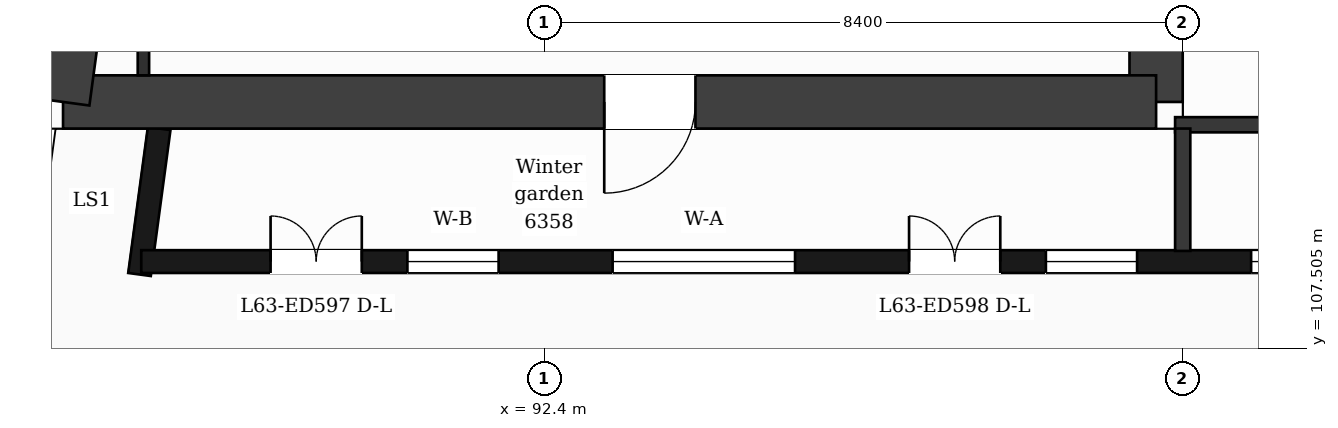
"""IFC4 building model, lengths in metres.
Left out: names, types, materials, properties, quantities, classifications, styles, units other than length and angle.
Written with IfcOpenShell. Run it as: python <this file> out.ifc"""

import sys

from ifc_helpers import new_model, si_unit, direction, frame, frame_2d, origin, place, context, subcontext, project, spatial, rectangle, extrude, element, fill, save


model = new_model("IFC4")
c1 = context("Model", 3, precision=1e-05, world=origin(), true_north=direction((0.0, 1.0)))
c2 = subcontext(c1, "Body", "Model", "MODEL_VIEW")
j1 = project(units=[si_unit("LENGTHUNIT", "METRE"), si_unit("PLANEANGLEUNIT", "RADIAN")], contexts=[c1])
p1 = place(None, origin())
s1 = spatial("IfcSite", under=j1, at=p1, CompositionType="ELEMENT")
p2 = place(p1, origin())
s2 = spatial("IfcBuilding", under=s1, at=p2, CompositionType="ELEMENT")
p3 = place(p2, frame((0.0, 0.0, 262.7)))
s3 = spatial("IfcBuildingStorey", under=s2, at=p3, CompositionType="ELEMENT", Elevation=262.7)
p4 = place(p3, frame((100.45, 132.05, 0.0), z_axis=(0.0, 0.0, 1.0), x_axis=(0.0, -1.0, 0.0)))
e1 = element("IfcWall", 1, at=p4, inside=s3, PredefinedType="SHEAR", context=c2, shape_type="SweptSolid", body=[
    extrude(rectangle(XDim=21.3, YDim=0.7, at=frame_2d((10.65, 0.0))), origin(), (0.0, 0.0, 1.0), 3.7),
])
p5 = place(p4, frame((7.9, 0.0, 0.0)))
e2 = element("IfcOpeningElement", 2, at=p5, cuts=e1, PredefinedType="OPENING", context=c2, shape_type="SweptSolid", body=[
    extrude(rectangle(XDim=1.4, YDim=2.1, at=frame_2d((0.7, 1.05))), frame((0.0, 0.36, 0.0), z_axis=(0.0, -1.0, 0.0), x_axis=(1.0, 0.0, 0.0)), (0.0, 0.0, 1.0), 0.72),
])
p6 = place(p3, frame((100.45, 110.75, 0.0), z_axis=(0.0, 0.0, 1.0), x_axis=(-1.0, 0.0, 0.0)))
e3 = element("IfcWall", 3, at=p6, inside=s3, PredefinedType="SHEAR", context=c2, shape_type="SweptSolid", body=[
    extrude(rectangle(XDim=14.38, YDim=0.7, at=frame_2d((7.19, 0.0))), origin(), (0.0, 0.0, 1.0), 3.7),
])
p7 = place(p6, frame((6.06, 0.0, 0.0)))
e4 = element("IfcOpeningElement", 4, at=p7, cuts=e3, PredefinedType="OPENING", context=c2, shape_type="SweptSolid", body=[
    extrude(rectangle(XDim=1.2, YDim=2.1, at=frame_2d((0.6, 1.05))), frame((0.0, 0.36, 0.0), z_axis=(0.0, -1.0, 0.0), x_axis=(1.0, 0.0, 0.0)), (0.0, 0.0, 1.0), 0.72),
])
p8 = place(p3, frame((86.07, 110.75, 0.0), z_axis=(0.0, 0.0, 1.0), x_axis=(0.133406218907, 0.991061441464, 0.0)))
e5 = element("IfcWall", 5, at=p8, inside=s3, PredefinedType="SHEAR", context=c2, shape_type="SweptSolid", body=[
    extrude(rectangle(XDim=21.492, YDim=0.7, at=frame_2d((10.746, 0.0))), origin(), (0.0, 0.0, 1.0), 3.7),
])
p9 = place(p3, frame((87.334, 110.4, 0.0), z_axis=(0.0, 0.0, 1.0), x_axis=(-0.13345962011, -0.991054251694, 0.0)))
e6 = element("IfcWall", 6, at=p9, inside=s3, PredefinedType="SOLIDWALL", context=c2, shape_type="SweptSolid", body=[
    extrude(rectangle(XDim=1.937, YDim=0.3, at=frame_2d((0.969, 0.0))), origin(), (0.0, 0.0, 1.0), 3.38),
])
p10 = place(p3, frame((87.099, 108.65, 0.0), z_axis=(0.0, 0.0, 1.0), x_axis=(1.0, 0.0, 0.0)))
e7 = element("IfcWall", 7, at=p10, inside=s3, PredefinedType="SOLIDWALL", context=c2, shape_type="SweptSolid", body=[
    extrude(rectangle(XDim=52.774, YDim=0.3, at=frame_2d((26.387, 0.0))), origin(), (0.0, 0.0, 1.0), 3.38),
])
p11 = place(p10, frame((1.701, 0.0, 0.0)))
e8 = element("IfcOpeningElement", 8, at=p11, cuts=e7, PredefinedType="OPENING", context=c2, shape_type="SweptSolid", body=[
    extrude(rectangle(XDim=1.2, YDim=2.4, at=frame_2d((0.6, 1.2))), frame((0.0, 0.16, 0.0), z_axis=(0.0, -1.0, 0.0), x_axis=(1.0, 0.0, 0.0)), (0.0, 0.0, 1.0), 0.32),
])
p12 = place(p10, frame((3.501, 0.0, 0.9)))
e9 = element("IfcOpeningElement", 9, at=p12, cuts=e7, PredefinedType="OPENING", context=c2, shape_type="SweptSolid", body=[
    extrude(rectangle(XDim=1.2, YDim=2.1, at=frame_2d((0.6, 1.05))), frame((0.0, 0.16, 0.0), z_axis=(0.0, -1.0, 0.0), x_axis=(1.0, 0.0, 0.0)), (0.0, 0.0, 1.0), 0.32),
])
p13 = place(p10, frame((6.201, 0.0, 0.9)))
e10 = element("IfcOpeningElement", 10, at=p13, cuts=e7, PredefinedType="OPENING", context=c2, shape_type="SweptSolid", body=[
    extrude(rectangle(XDim=2.4, YDim=2.1, at=frame_2d((1.2, 1.05))), frame((0.0, 0.16, 0.0), z_axis=(0.0, -1.0, 0.0), x_axis=(1.0, 0.0, 0.0)), (0.0, 0.0, 1.0), 0.32),
])
p14 = place(p10, frame((10.102, 0.0, 0.0)))
e11 = element("IfcOpeningElement", 11, at=p14, cuts=e7, PredefinedType="OPENING", context=c2, shape_type="SweptSolid", body=[
    extrude(rectangle(XDim=1.2, YDim=2.4, at=frame_2d((0.6, 1.2))), frame((0.0, 0.16, 0.0), z_axis=(0.0, -1.0, 0.0), x_axis=(1.0, 0.0, 0.0)), (0.0, 0.0, 1.0), 0.32),
])
p15 = place(p10, frame((11.901, 0.0, 0.9)))
e12 = element("IfcOpeningElement", 12, at=p15, cuts=e7, PredefinedType="OPENING", context=c2, shape_type="SweptSolid", body=[
    extrude(rectangle(XDim=1.2, YDim=2.1, at=frame_2d((0.6, 1.05))), frame((0.0, 0.16, 0.0), z_axis=(0.0, -1.0, 0.0), x_axis=(1.0, 0.0, 0.0)), (0.0, 0.0, 1.0), 0.32),
])
p16 = place(p10, frame((14.602, 0.0, 0.9)))
e13 = element("IfcOpeningElement", 13, at=p16, cuts=e7, PredefinedType="OPENING", context=c2, shape_type="SweptSolid", body=[
    extrude(rectangle(XDim=2.4, YDim=2.1, at=frame_2d((1.2, 1.05))), frame((0.0, 0.16, 0.0), z_axis=(0.0, -1.0, 0.0), x_axis=(1.0, 0.0, 0.0)), (0.0, 0.0, 1.0), 0.32),
])
p17 = place(p10, frame((18.802, 0.0, 0.9)))
e14 = element("IfcOpeningElement", 14, at=p17, cuts=e7, PredefinedType="OPENING", context=c2, shape_type="SweptSolid", body=[
    extrude(rectangle(XDim=2.4, YDim=2.1, at=frame_2d((1.2, 1.05))), frame((0.0, 0.16, 0.0), z_axis=(0.0, -1.0, 0.0), x_axis=(1.0, 0.0, 0.0)), (0.0, 0.0, 1.0), 0.32),
])
p18 = place(p10, frame((23.602, 0.0, 0.9)))
e15 = element("IfcOpeningElement", 15, at=p18, cuts=e7, PredefinedType="OPENING", context=c2, shape_type="SweptSolid", body=[
    extrude(rectangle(XDim=1.2, YDim=2.1, at=frame_2d((0.6, 1.05))), frame((0.0, 0.16, 0.0), z_axis=(0.0, -1.0, 0.0), x_axis=(1.0, 0.0, 0.0)), (0.0, 0.0, 1.0), 0.32),
])
p19 = place(p10, frame((27.802, 0.0, 0.9)))
e16 = element("IfcOpeningElement", 16, at=p19, cuts=e7, PredefinedType="OPENING", context=c2, shape_type="SweptSolid", body=[
    extrude(rectangle(XDim=1.2, YDim=2.1, at=frame_2d((0.6, 1.05))), frame((0.0, 0.16, 0.0), z_axis=(0.0, -1.0, 0.0), x_axis=(1.0, 0.0, 0.0)), (0.0, 0.0, 1.0), 0.32),
])
p20 = place(p10, frame((31.401, 0.0, 0.9)))
e17 = element("IfcOpeningElement", 17, at=p20, cuts=e7, PredefinedType="OPENING", context=c2, shape_type="SweptSolid", body=[
    extrude(rectangle(XDim=2.4, YDim=2.1, at=frame_2d((1.2, 1.05))), frame((0.0, 0.16, 0.0), z_axis=(0.0, -1.0, 0.0), x_axis=(1.0, 0.0, 0.0)), (0.0, 0.0, 1.0), 0.32),
])
p21 = place(p10, frame((35.602, 0.0, 0.9)))
e18 = element("IfcOpeningElement", 18, at=p21, cuts=e7, PredefinedType="OPENING", context=c2, shape_type="SweptSolid", body=[
    extrude(rectangle(XDim=2.4, YDim=2.1, at=frame_2d((1.2, 1.05))), frame((0.0, 0.16, 0.0), z_axis=(0.0, -1.0, 0.0), x_axis=(1.0, 0.0, 0.0)), (0.0, 0.0, 1.0), 0.32),
])
p22 = place(p10, frame((39.802, 0.0, 0.9)))
e19 = element("IfcOpeningElement", 19, at=p22, cuts=e7, PredefinedType="OPENING", context=c2, shape_type="SweptSolid", body=[
    extrude(rectangle(XDim=2.4, YDim=2.1, at=frame_2d((1.2, 1.05))), frame((0.0, 0.16, 0.0), z_axis=(0.0, -1.0, 0.0), x_axis=(1.0, 0.0, 0.0)), (0.0, 0.0, 1.0), 0.32),
])
p23 = place(p10, frame((44.001, 0.0, 0.9)))
e20 = element("IfcOpeningElement", 20, at=p23, cuts=e7, PredefinedType="OPENING", context=c2, shape_type="SweptSolid", body=[
    extrude(rectangle(XDim=2.4, YDim=2.1, at=frame_2d((1.2, 1.05))), frame((0.0, 0.16, 0.0), z_axis=(0.0, -1.0, 0.0), x_axis=(1.0, 0.0, 0.0)), (0.0, 0.0, 1.0), 0.32),
])
p24 = place(p10, frame((48.201, 0.0, 0.9)))
e21 = element("IfcOpeningElement", 21, at=p24, cuts=e7, PredefinedType="OPENING", context=c2, shape_type="SweptSolid", body=[
    extrude(rectangle(XDim=2.4, YDim=2.1, at=frame_2d((1.2, 1.05))), frame((0.0, 0.16, 0.0), z_axis=(0.0, -1.0, 0.0), x_axis=(1.0, 0.0, 0.0)), (0.0, 0.0, 1.0), 0.32),
])
p25 = place(p3, frame((100.7, 110.45, 0.0), z_axis=(0.0, 0.0, 1.0), x_axis=(1.0, 0.0, 0.0)))
e22 = element("IfcWall", 22, at=p25, inside=s3, PredefinedType="PARTITIONING", context=c2, shape_type="SweptSolid", body=[
    extrude(rectangle(XDim=25.4, YDim=0.2, at=frame_2d((12.7, 0.0))), origin(), (0.0, 0.0, 1.0), 3.38),
])
p26 = place(p3, frame((87.127, 111.1, 0.0), z_axis=(0.0, 0.0, 1.0), x_axis=(0.0, 1.0, 0.0)))
e23 = element("IfcWall", 23, at=p26, inside=s3, PredefinedType="PARTITIONING", context=c2, shape_type="SweptSolid", body=[
    extrude(rectangle(XDim=1.8, YDim=0.15, at=frame_2d((0.9, 0.0))), origin(), (0.0, 0.0, 1.0), 3.38),
])
p27 = place(p3, frame((100.8, 108.79, 0.0), z_axis=(0.0, 0.0, 1.0), x_axis=(0.0, 1.0, 0.0)))
e24 = element("IfcWall", 24, at=p27, inside=s3, PredefinedType="PARTITIONING", context=c2, shape_type="SweptSolid", body=[
    extrude(rectangle(XDim=1.61, YDim=0.2, at=frame_2d((0.805, 0.0))), origin(), (0.0, 0.0, 1.0), 3.38),
])
p28 = place(p11, origin())
e25 = element("IfcDoor", 25, at=p28, inside=s3, OperationType="DOUBLE_DOOR_SINGLE_SWING", PredefinedType="DOOR", context=c2, shape_type="SweptSolid", body=[
    extrude(rectangle(XDim=1.2, YDim=2.4, at=frame_2d((0.6, 1.2))), frame((0.0, 0.025, 0.0), z_axis=(0.0, -1.0, 0.0), x_axis=(1.0, 0.0, 0.0)), (0.0, 0.0, 1.0), 0.05),
])
fill(e8, e25)
p29 = place(p12, origin())
e26 = element("IfcWindow", 26, at=p29, inside=s3, PartitioningType="SINGLE_PANEL", PredefinedType="WINDOW", context=c2, shape_type="SweptSolid", body=[
    extrude(rectangle(XDim=1.2, YDim=2.1, at=frame_2d((0.6, 1.05))), frame((0.0, 0.03, 0.0), z_axis=(0.0, -1.0, 0.0), x_axis=(1.0, 0.0, 0.0)), (0.0, 0.0, 1.0), 0.06),
])
fill(e9, e26)
p30 = place(p13, origin())
e27 = element("IfcWindow", 27, at=p30, inside=s3, PartitioningType="SINGLE_PANEL", PredefinedType="WINDOW", context=c2, shape_type="SweptSolid", body=[
    extrude(rectangle(XDim=2.4, YDim=2.1, at=frame_2d((1.2, 1.05))), frame((0.0, 0.03, 0.0), z_axis=(0.0, -1.0, 0.0), x_axis=(1.0, 0.0, 0.0)), (0.0, 0.0, 1.0), 0.06),
])
fill(e10, e27)
p31 = place(p14, origin())
e28 = element("IfcDoor", 28, at=p31, inside=s3, OperationType="DOUBLE_DOOR_SINGLE_SWING", PredefinedType="DOOR", context=c2, shape_type="SweptSolid", body=[
    extrude(rectangle(XDim=1.2, YDim=2.4, at=frame_2d((0.6, 1.2))), frame((0.0, 0.025, 0.0), z_axis=(0.0, -1.0, 0.0), x_axis=(1.0, 0.0, 0.0)), (0.0, 0.0, 1.0), 0.05),
])
fill(e11, e28)
p32 = place(p15, origin())
e29 = element("IfcWindow", 29, at=p32, inside=s3, PartitioningType="SINGLE_PANEL", PredefinedType="WINDOW", context=c2, shape_type="SweptSolid", body=[
    extrude(rectangle(XDim=1.2, YDim=2.1, at=frame_2d((0.6, 1.05))), frame((0.0, 0.03, 0.0), z_axis=(0.0, -1.0, 0.0), x_axis=(1.0, 0.0, 0.0)), (0.0, 0.0, 1.0), 0.06),
])
fill(e12, e29)
p33 = place(p16, origin())
e30 = element("IfcWindow", 30, at=p33, inside=s3, PartitioningType="SINGLE_PANEL", PredefinedType="WINDOW", context=c2, shape_type="SweptSolid", body=[
    extrude(rectangle(XDim=2.4, YDim=2.1, at=frame_2d((1.2, 1.05))), frame((0.0, 0.03, 0.0), z_axis=(0.0, -1.0, 0.0), x_axis=(1.0, 0.0, 0.0)), (0.0, 0.0, 1.0), 0.06),
])
fill(e13, e30)
p34 = place(p7, origin())
e31 = element("IfcDoor", 31, at=p34, inside=s3, OperationType="SINGLE_SWING_RIGHT", PredefinedType="DOOR", context=c2, shape_type="SweptSolid", body=[
    extrude(rectangle(XDim=1.2, YDim=2.1, at=frame_2d((0.6, 1.05))), frame((0.0, 0.025, 0.0), z_axis=(0.0, -1.0, 0.0), x_axis=(1.0, 0.0, 0.0)), (0.0, 0.0, 1.0), 0.05),
])
fill(e4, e31)
save(model, sys.argv[1])
